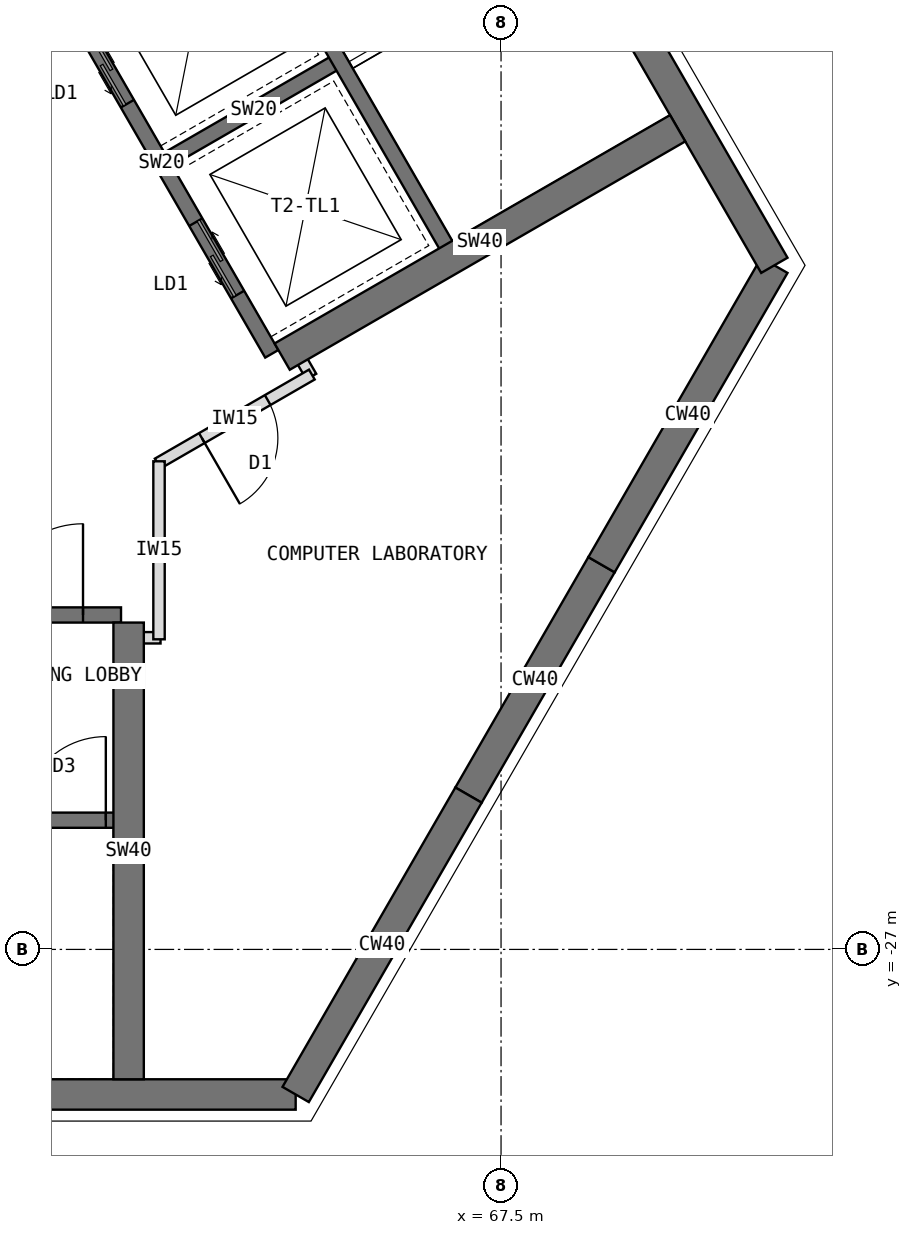
"""IFC4 building model, lengths in metres.
Left out: names, types, materials, properties, quantities, classifications, styles, units other than length and angle.
Written with IfcOpenShell. Run it as: python <this file> out.ifc"""

import sys

from ifc_helpers import new_model, si_unit, direction, frame, frame_2d, origin, place, context, subcontext, project, spatial, rectangle, extrude, element, fill, save


model = new_model("IFC4")
c1 = context("Model", 3, precision=1e-05, world=origin(), true_north=direction((0.0, 1.0)))
c2 = subcontext(c1, "Body", "Model", "MODEL_VIEW")
j1 = project(units=[si_unit("LENGTHUNIT", "METRE"), si_unit("PLANEANGLEUNIT", "RADIAN")], contexts=[c1])
p1 = place(None, origin())
s1 = spatial("IfcSite", under=j1, at=p1, CompositionType="ELEMENT")
p2 = place(p1, origin())
s2 = spatial("IfcBuilding", under=s1, at=p2, CompositionType="ELEMENT")
p3 = place(p2, frame((0.0, 0.0, 255.5)))
s3 = spatial("IfcBuildingStorey", under=s2, at=p3, CompositionType="ELEMENT", Elevation=255.5)
p4 = place(p3, frame((52.202, -28.908, 0.0), z_axis=(0.0, 0.0, 1.0), x_axis=(1.0, 0.0, 0.0)))
e1 = element("IfcWall", 1, at=p4, inside=s3, PredefinedType="SHEAR", context=c2, shape_type="SweptSolid", body=[
    extrude(rectangle(XDim=12.596, YDim=0.4, at=frame_2d((6.298, 0.0))), origin(), (0.0, 0.0, 1.0), 4.0),
])
p5 = place(p3, frame((64.798, -28.908, 0.0), z_axis=(0.0, 0.0, 1.0), x_axis=(0.499984222037, 0.866034513004, 0.0)))
e2 = element("IfcWall", 2, at=p5, inside=s3, PredefinedType="SHEAR", context=c2, shape_type="SweptSolid", body=[
    extrude(rectangle(XDim=4.548, YDim=0.4, at=frame_2d((2.274, 0.0))), origin(), (0.0, 0.0, 1.0), 4.0),
])
p6 = place(p3, frame((67.072, -24.97, 0.0), z_axis=(0.0, 0.0, 1.0), x_axis=(0.500010275428, 0.866019471182, 0.0)))
e3 = element("IfcWall", 3, at=p6, inside=s3, PredefinedType="SHEAR", context=c2, shape_type="SweptSolid", body=[
    extrude(rectangle(XDim=3.5, YDim=0.4, at=frame_2d((1.75, 0.0))), origin(), (0.0, 0.0, 1.0), 4.0),
])
p7 = place(p3, frame((68.822, -21.939, 0.0), z_axis=(0.0, 0.0, 1.0), x_axis=(0.500024481964, 0.866011268655, 0.0)))
e4 = element("IfcWall", 4, at=p7, inside=s3, PredefinedType="SHEAR", context=c2, shape_type="SweptSolid", body=[
    extrude(rectangle(XDim=4.548, YDim=0.4, at=frame_2d((2.274, 0.0))), origin(), (0.0, 0.0, 1.0), 4.0),
])
p8 = place(p3, frame((71.096, -18.0, 0.0), z_axis=(0.0, 0.0, 1.0), x_axis=(-0.500005998175, 0.866021940709, 0.0)))
e5 = element("IfcWall", 5, at=p8, inside=s3, PredefinedType="SHEAR", context=c2, shape_type="SweptSolid", body=[
    extrude(rectangle(XDim=12.596, YDim=0.4, at=frame_2d((6.298, 0.0))), origin(), (0.0, 0.0, 1.0), 4.0),
])
p9 = place(p3, frame((54.5, -22.6, 0.0), z_axis=(0.0, 0.0, 1.0), x_axis=(1.0, 0.0, 0.0)))
e6 = element("IfcWall", 6, at=p9, inside=s3, PredefinedType="SHEAR", context=c2, shape_type="SweptSolid", body=[
    extrude(rectangle(XDim=8.0, YDim=0.2, at=frame_2d((4.0, 0.0))), origin(), (0.0, 0.0, 1.0), 4.0),
])
p10 = place(p9, frame((6.3, 0.0, 0.0)))
e7 = element("IfcOpeningElement", 7, at=p10, cuts=e6, PredefinedType="OPENING", context=c2, shape_type="SweptSolid", body=[
    extrude(rectangle(XDim=1.2, YDim=2.1, at=frame_2d((0.6, 1.05))), frame((0.0, 0.11, 0.0), z_axis=(0.0, -1.0, 0.0), x_axis=(1.0, 0.0, 0.0)), (0.0, 0.0, 1.0), 0.22),
])
p11 = place(p9, frame((0.9, 0.0, 0.0)))
e8 = element("IfcOpeningElement", 8, at=p11, cuts=e6, PredefinedType="OPENING", context=c2, shape_type="SweptSolid", body=[
    extrude(rectangle(XDim=1.1, YDim=2.2, at=frame_2d((0.55, 1.1))), frame((0.0, 0.11, 0.0), z_axis=(0.0, -1.0, 0.0), x_axis=(1.0, 0.0, 0.0)), (0.0, 0.0, 1.0), 0.22),
])
p12 = place(p3, frame((54.5, -25.3, 0.0), z_axis=(0.0, 0.0, 1.0), x_axis=(1.0, 0.0, 0.0)))
e9 = element("IfcWall", 9, at=p12, inside=s3, PredefinedType="SHEAR", context=c2, shape_type="SweptSolid", body=[
    extrude(rectangle(XDim=8.0, YDim=0.2, at=frame_2d((4.0, 0.0))), origin(), (0.0, 0.0, 1.0), 4.0),
])
p13 = place(p12, frame((6.7, 0.0, 0.0)))
e10 = element("IfcOpeningElement", 10, at=p13, cuts=e9, PredefinedType="OPENING", context=c2, shape_type="SweptSolid", body=[
    extrude(rectangle(XDim=1.1, YDim=2.1, at=frame_2d((0.55, 1.05))), frame((0.0, 0.11, 0.0), z_axis=(0.0, -1.0, 0.0), x_axis=(1.0, 0.0, 0.0)), (0.0, 0.0, 1.0), 0.22),
])
p14 = place(p3, frame((62.6, -22.7, 0.0), z_axis=(0.0, 0.0, 1.0), x_axis=(0.0, -1.0, 0.0)))
e11 = element("IfcWall", 11, at=p14, inside=s3, PredefinedType="SHEAR", context=c2, shape_type="SweptSolid", body=[
    extrude(rectangle(XDim=6.008, YDim=0.4, at=frame_2d((3.004, 0.0))), origin(), (0.0, 0.0, 1.0), 4.0),
])
p15 = place(p3, frame((64.484, -19.164, 0.0), z_axis=(0.0, 0.0, 1.0), x_axis=(-0.49999894854, 0.866026010844, 0.0)))
e12 = element("IfcWall", 12, at=p15, inside=s3, PredefinedType="SHEAR", context=c2, shape_type="SweptSolid", body=[
    extrude(rectangle(XDim=8.0, YDim=0.2, at=frame_2d((4.0, 0.0))), origin(), (0.0, 0.0, 1.0), 4.0),
])
p16 = place(p15, frame((6.3, 0.0, 0.0)))
e13 = element("IfcOpeningElement", 13, at=p16, cuts=e12, PredefinedType="OPENING", context=c2, shape_type="SweptSolid", body=[
    extrude(rectangle(XDim=1.2, YDim=2.1, at=frame_2d((0.6, 1.05))), frame((0.0, 0.11, 0.0), z_axis=(0.0, -1.0, 0.0), x_axis=(1.0, 0.0, 0.0)), (0.0, 0.0, 1.0), 0.22),
])
p17 = place(p15, frame((0.9, 0.0, 0.0)))
e14 = element("IfcOpeningElement", 14, at=p17, cuts=e12, PredefinedType="OPENING", context=c2, shape_type="SweptSolid", body=[
    extrude(rectangle(XDim=1.1, YDim=2.2, at=frame_2d((0.55, 1.1))), frame((0.0, 0.11, 0.0), z_axis=(0.0, -1.0, 0.0), x_axis=(1.0, 0.0, 0.0)), (0.0, 0.0, 1.0), 0.22),
])
p18 = place(p15, frame((3.8, 0.0, 0.0)))
e15 = element("IfcOpeningElement", 15, at=p18, cuts=e12, PredefinedType="OPENING", context=c2, shape_type="SweptSolid", body=[
    extrude(rectangle(XDim=1.1, YDim=2.2, at=frame_2d((0.55, 1.1))), frame((0.0, 0.11, 0.0), z_axis=(0.0, -1.0, 0.0), x_axis=(1.0, 0.0, 0.0)), (0.0, 0.0, 1.0), 0.22),
])
p19 = place(p3, frame((63.12, -16.603, 0.0), z_axis=(0.0, 0.0, 1.0), x_axis=(0.866062058628, 0.499936506574, 0.0)))
e16 = element("IfcWall", 16, at=p19, inside=s3, PredefinedType="SHEAR", context=c2, shape_type="SweptSolid", body=[
    extrude(rectangle(XDim=2.6, YDim=0.2, at=frame_2d((1.3, 0.0))), origin(), (0.0, 0.0, 1.0), 4.0),
])
p20 = place(p3, frame((66.822, -17.814, 0.0), z_axis=(0.0, 0.0, 1.0), x_axis=(-0.49999894854, 0.866026010844, 0.0)))
e17 = element("IfcWall", 17, at=p20, inside=s3, PredefinedType="SHEAR", context=c2, shape_type="SweptSolid", body=[
    extrude(rectangle(XDim=8.0, YDim=0.2, at=frame_2d((4.0, 0.0))), origin(), (0.0, 0.0, 1.0), 4.0),
])
p21 = place(p20, frame((6.7, 0.0, 0.0)))
e18 = element("IfcOpeningElement", 18, at=p21, cuts=e17, PredefinedType="OPENING", context=c2, shape_type="SweptSolid", body=[
    extrude(rectangle(XDim=1.1, YDim=2.1, at=frame_2d((0.55, 1.05))), frame((0.0, 0.11, 0.0), z_axis=(0.0, -1.0, 0.0), x_axis=(1.0, 0.0, 0.0)), (0.0, 0.0, 1.0), 0.22),
])
p22 = place(p3, frame((64.62, -19.201, 0.0), z_axis=(0.0, 0.0, 1.0), x_axis=(0.866026570101, 0.499997979876, 0.0)))
e19 = element("IfcWall", 19, at=p22, inside=s3, PredefinedType="SHEAR", context=c2, shape_type="SweptSolid", body=[
    extrude(rectangle(XDim=6.008, YDim=0.4, at=frame_2d((3.004, 0.0))), origin(), (0.0, 0.0, 1.0), 4.0),
])
for number, where, z_axis, x_axis in (
    (20, (63.02, -22.9, 0.0), (0.0, 0.0, 1.0), (-1.0, 0.0, 0.0)),
    (21, (64.789, -19.092, 0.0), (0.0, 0.0, 1.0), (0.5, -0.866, 0.0)),
):
    element("IfcWall", number, at=place(p3, frame(where, z_axis=z_axis, x_axis=x_axis)), inside=s3, PredefinedType="PARTITIONING", context=c2, shape_type="SweptSolid", body=[
        extrude(rectangle(XDim=0.43, YDim=0.15, at=frame_2d((0.215, 0.0))), origin(), (0.0, 0.0, 1.0), 3.8),
    ])
p23 = place(p3, frame((65.011, -19.437, 0.0), z_axis=(0.0, 0.0, 1.0), x_axis=(-0.865982457891, -0.500074377092, 0.0)))
e22 = element("IfcWall", 22, at=p23, inside=s3, PredefinedType="PARTITIONING", context=c2, shape_type="SweptSolid", body=[
    extrude(rectangle(XDim=2.342, YDim=0.15, at=frame_2d((1.171, 0.0))), origin(), (0.0, 0.0, 1.0), 3.8),
])
p24 = place(p23, frame((0.671, 0.0, 0.0)))
e23 = element("IfcOpeningElement", 23, at=p24, cuts=e22, PredefinedType="OPENING", context=c2, shape_type="SweptSolid", body=[
    extrude(rectangle(XDim=1.0, YDim=2.1, at=frame_2d((0.5, 1.05))), frame((0.0, 0.085, 0.0), z_axis=(0.0, -1.0, 0.0), x_axis=(1.0, 0.0, 0.0)), (0.0, 0.0, 1.0), 0.17),
])
p25 = place(p3, frame((63.0, -20.578, 0.0), z_axis=(0.0, 0.0, 1.0), x_axis=(0.0, -1.0, 0.0)))
e24 = element("IfcWall", 24, at=p25, inside=s3, PredefinedType="PARTITIONING", context=c2, shape_type="SweptSolid", body=[
    extrude(rectangle(XDim=2.342, YDim=0.15, at=frame_2d((1.171, 0.0))), origin(), (0.0, 0.0, 1.0), 3.8),
])
p26 = place(p10, origin())
e25 = element("IfcDoor", 25, at=p26, inside=s3, OperationType="SINGLE_SWING_RIGHT", PredefinedType="DOOR", context=c2, shape_type="SweptSolid", body=[
    extrude(rectangle(XDim=1.2, YDim=2.1, at=frame_2d((0.6, 1.05))), frame((0.0, 0.025, 0.0), z_axis=(0.0, -1.0, 0.0), x_axis=(1.0, 0.0, 0.0)), (0.0, 0.0, 1.0), 0.05),
])
fill(e7, e25)
p27 = place(p13, origin())
e26 = element("IfcDoor", 26, at=p27, inside=s3, OperationType="SINGLE_SWING_RIGHT", PredefinedType="DOOR", context=c2, shape_type="SweptSolid", body=[
    extrude(rectangle(XDim=1.1, YDim=2.1, at=frame_2d((0.55, 1.05))), frame((0.0, 0.025, 0.0), z_axis=(0.0, -1.0, 0.0), x_axis=(1.0, 0.0, 0.0)), (0.0, 0.0, 1.0), 0.05),
])
fill(e10, e26)
p28 = place(p17, origin())
e27 = element("IfcDoor", 27, at=p28, inside=s3, OperationType="DOUBLE_DOOR_SLIDING", PredefinedType="DOOR", context=c2, shape_type="SweptSolid", body=[
    extrude(rectangle(XDim=1.1, YDim=2.2, at=frame_2d((0.55, 1.1))), frame((0.0, 0.025, 0.0), z_axis=(0.0, -1.0, 0.0), x_axis=(1.0, 0.0, 0.0)), (0.0, 0.0, 1.0), 0.05),
])
fill(e14, e27)
p29 = place(p18, origin())
e28 = element("IfcDoor", 28, at=p29, inside=s3, OperationType="DOUBLE_DOOR_SLIDING", PredefinedType="DOOR", context=c2, shape_type="SweptSolid", body=[
    extrude(rectangle(XDim=1.1, YDim=2.2, at=frame_2d((0.55, 1.1))), frame((0.0, 0.025, 0.0), z_axis=(0.0, -1.0, 0.0), x_axis=(1.0, 0.0, 0.0)), (0.0, 0.0, 1.0), 0.05),
])
fill(e15, e28)
p30 = place(p24, origin())
e29 = element("IfcDoor", 29, at=p30, inside=s3, OperationType="SINGLE_SWING_RIGHT", PredefinedType="DOOR", context=c2, shape_type="SweptSolid", body=[
    extrude(rectangle(XDim=1.0, YDim=2.1, at=frame_2d((0.5, 1.05))), frame((0.0, 0.025, 0.0), z_axis=(0.0, -1.0, 0.0), x_axis=(1.0, 0.0, 0.0)), (0.0, 0.0, 1.0), 0.05),
])
fill(e23, e29)
save(model, sys.argv[1])
